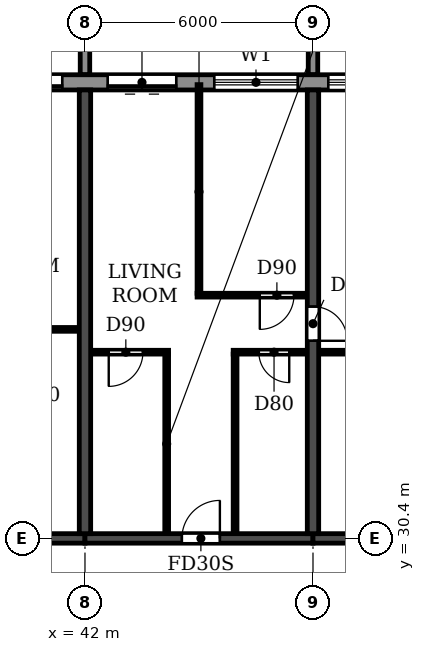
"""IFC4 building model, lengths in metres.
Left out: names, types, materials, properties, quantities, classifications, styles, units other than length and angle.
Written with IfcOpenShell. Run it as: python <this file> out.ifc"""

import sys

from ifc_helpers import new_model, si_unit, direction, frame, frame_2d, origin, place, context, subcontext, project, spatial, polyline, rectangle, outline, extrude, source, transform, mapped, element, fill, save


model = new_model("IFC4")
c1 = context("Model", 3, precision=1e-05, world=origin(), true_north=direction((0.0, 1.0)))
c2 = subcontext(c1, "Body", "Model", "MODEL_VIEW")
j1 = project(units=[si_unit("LENGTHUNIT", "METRE"), si_unit("PLANEANGLEUNIT", "RADIAN")], contexts=[c1])
p1 = place(None, origin())
s1 = spatial("IfcSite", under=j1, at=p1, CompositionType="ELEMENT")
p2 = place(p1, origin())
s2 = spatial("IfcBuilding", under=s1, at=p2, CompositionType="ELEMENT")
p3 = place(p2, frame((0.0, 0.0, 132.3)))
s3 = spatial("IfcBuildingStorey", under=s2, at=p3, CompositionType="ELEMENT", Elevation=132.3)
p4 = place(p3, frame((42.0, 30.525, 0.0), z_axis=(0.0, 0.0, 1.0), x_axis=(0.0, 1.0, 0.0)))
e1 = element("IfcWall", 1, at=p4, inside=s3, PredefinedType="SHEAR", context=c2, shape_type="SweptSolid", body=[
    extrude(rectangle(XDim=11.675, YDim=0.3, at=frame_2d((5.837, 0.0))), origin(), (0.0, 0.0, 1.0), 3.07),
])
p5 = place(p3, frame((48.0, 30.525, 0.0), z_axis=(0.0, 0.0, 1.0), x_axis=(0.0, 1.0, 0.0)))
e2 = element("IfcWall", 2, at=p5, inside=s3, PredefinedType="SHEAR", context=c2, shape_type="SweptSolid", body=[
    extrude(rectangle(XDim=11.675, YDim=0.3, at=frame_2d((5.837, 0.0))), origin(), (0.0, 0.0, 1.0), 3.07),
])
p6 = place(p5, frame((5.075, 0.0, 0.0)))
e3 = element("IfcOpeningElement", 3, at=p6, cuts=e2, PredefinedType="OPENING", context=c2, shape_type="SweptSolid", body=[
    extrude(rectangle(XDim=0.9, YDim=2.1, at=frame_2d((0.45, 1.05))), frame((0.0, 0.16, 0.0), z_axis=(0.0, -1.0, 0.0), x_axis=(1.0, 0.0, 0.0)), (0.0, 0.0, 1.0), 0.32),
])
p7 = place(p3, frame((36.0, 30.4, 0.0), z_axis=(0.0, 0.0, 1.0), x_axis=(1.0, 0.0, 0.0)))
e4 = element("IfcWall", 4, at=p7, inside=s3, PredefinedType="SHEAR", context=c2, shape_type="SweptSolid", body=[
    extrude(rectangle(XDim=6.0, YDim=0.25, at=frame_2d((3.0, 0.0))), origin(), (0.0, 0.0, 1.0), 2.47),
])
p8 = place(p7, frame((2.45, 0.0, 0.0)))
e5 = element("IfcOpeningElement", 5, at=p8, cuts=e4, PredefinedType="OPENING", context=c2, shape_type="SweptSolid", body=[
    extrude(rectangle(XDim=1.0, YDim=2.1, at=frame_2d((0.5, 1.05))), frame((0.0, 0.135, 0.0), z_axis=(0.0, -1.0, 0.0), x_axis=(1.0, 0.0, 0.0)), (0.0, 0.0, 1.0), 0.27),
])
p9 = place(p3, frame((42.0, 30.4, 0.0), z_axis=(0.0, 0.0, 1.0), x_axis=(1.0, 0.0, 0.0)))
e6 = element("IfcWall", 6, at=p9, inside=s3, PredefinedType="SHEAR", context=c2, shape_type="SweptSolid", body=[
    extrude(rectangle(XDim=6.0, YDim=0.25, at=frame_2d((3.0, 0.0))), origin(), (0.0, 0.0, 1.0), 2.47),
])
p10 = place(p9, frame((2.55, 0.0, 0.0)))
e7 = element("IfcOpeningElement", 7, at=p10, cuts=e6, PredefinedType="OPENING", context=c2, shape_type="SweptSolid", body=[
    extrude(rectangle(XDim=1.0, YDim=2.1, at=frame_2d((0.5, 1.05))), frame((0.0, 0.135, 0.0), z_axis=(0.0, -1.0, 0.0), x_axis=(1.0, 0.0, 0.0)), (0.0, 0.0, 1.0), 0.27),
])
p11 = place(p3, frame((48.0, 30.4, 0.0), z_axis=(0.0, 0.0, 1.0), x_axis=(1.0, 0.0, 0.0)))
e8 = element("IfcWall", 8, at=p11, inside=s3, PredefinedType="SHEAR", context=c2, shape_type="SweptSolid", body=[
    extrude(rectangle(XDim=6.0, YDim=0.25, at=frame_2d((3.0, 0.0))), origin(), (0.0, 0.0, 1.0), 2.47),
])
p12 = place(p3, frame((85.317, 42.4, 0.0), z_axis=(0.0, 0.0, 1.0), x_axis=(-1.0, 0.0, 0.0)))
e9 = element("IfcWall", 9, at=p12, inside=s3, PredefinedType="STANDARD", context=c2, shape_type="SweptSolid", body=[
    extrude(rectangle(XDim=68.634, YDim=0.4, at=frame_2d((34.317, 0.0))), origin(), (0.0, 0.0, 1.0), 3.07),
])
p13 = place(p12, frame((64.917, 0.0, 0.0)))
e10 = element("IfcOpeningElement", 10, at=p13, cuts=e9, PredefinedType="OPENING", context=c2, shape_type="SweptSolid", body=[
    extrude(rectangle(XDim=1.8, YDim=2.4, at=frame_2d((0.9, 1.2))), frame((0.0, 0.21, 0.0), z_axis=(0.0, -1.0, 0.0), x_axis=(1.0, 0.0, 0.0)), (0.0, 0.0, 1.0), 0.42),
])
p14 = place(p12, frame((61.717, 0.0, 0.9)))
e11 = element("IfcOpeningElement", 11, at=p14, cuts=e9, PredefinedType="OPENING", context=c2, shape_type="SweptSolid", body=[
    extrude(rectangle(XDim=2.2, YDim=1.5, at=frame_2d((1.1, 0.75))), frame((0.0, 0.21, 0.0), z_axis=(0.0, -1.0, 0.0), x_axis=(1.0, 0.0, 0.0)), (0.0, 0.0, 1.0), 0.42),
])
p15 = place(p12, frame((58.717, 0.0, 0.9)))
e12 = element("IfcOpeningElement", 12, at=p15, cuts=e9, PredefinedType="OPENING", context=c2, shape_type="SweptSolid", body=[
    extrude(rectangle(XDim=2.2, YDim=1.5, at=frame_2d((1.1, 0.75))), frame((0.0, 0.21, 0.0), z_axis=(0.0, -1.0, 0.0), x_axis=(1.0, 0.0, 0.0)), (0.0, 0.0, 1.0), 0.42),
])
p16 = place(p12, frame((55.717, 0.0, 0.9)))
e13 = element("IfcOpeningElement", 13, at=p16, cuts=e9, PredefinedType="OPENING", context=c2, shape_type="SweptSolid", body=[
    extrude(rectangle(XDim=2.2, YDim=1.5, at=frame_2d((1.1, 0.75))), frame((0.0, 0.21, 0.0), z_axis=(0.0, -1.0, 0.0), x_axis=(1.0, 0.0, 0.0)), (0.0, 0.0, 1.0), 0.42),
])
p17 = place(p12, frame((52.917, 0.0, 0.0)))
e14 = element("IfcOpeningElement", 14, at=p17, cuts=e9, PredefinedType="OPENING", context=c2, shape_type="SweptSolid", body=[
    extrude(rectangle(XDim=1.8, YDim=2.4, at=frame_2d((0.9, 1.2))), frame((0.0, 0.21, 0.0), z_axis=(0.0, -1.0, 0.0), x_axis=(1.0, 0.0, 0.0)), (0.0, 0.0, 1.0), 0.42),
])
p18 = place(p12, frame((49.717, 0.0, 0.9)))
e15 = element("IfcOpeningElement", 15, at=p18, cuts=e9, PredefinedType="OPENING", context=c2, shape_type="SweptSolid", body=[
    extrude(rectangle(XDim=2.2, YDim=1.5, at=frame_2d((1.1, 0.75))), frame((0.0, 0.21, 0.0), z_axis=(0.0, -1.0, 0.0), x_axis=(1.0, 0.0, 0.0)), (0.0, 0.0, 1.0), 0.42),
])
p19 = place(p12, frame((46.717, 0.0, 0.9)))
e16 = element("IfcOpeningElement", 16, at=p19, cuts=e9, PredefinedType="OPENING", context=c2, shape_type="SweptSolid", body=[
    extrude(rectangle(XDim=2.2, YDim=1.5, at=frame_2d((1.1, 0.75))), frame((0.0, 0.21, 0.0), z_axis=(0.0, -1.0, 0.0), x_axis=(1.0, 0.0, 0.0)), (0.0, 0.0, 1.0), 0.42),
])
p20 = place(p12, frame((43.917, 0.0, 0.0)))
e17 = element("IfcOpeningElement", 17, at=p20, cuts=e9, PredefinedType="OPENING", context=c2, shape_type="SweptSolid", body=[
    extrude(rectangle(XDim=1.8, YDim=2.4, at=frame_2d((0.9, 1.2))), frame((0.0, 0.21, 0.0), z_axis=(0.0, -1.0, 0.0), x_axis=(1.0, 0.0, 0.0)), (0.0, 0.0, 1.0), 0.42),
])
p21 = place(p12, frame((40.917, 0.0, 0.0)))
e18 = element("IfcOpeningElement", 18, at=p21, cuts=e9, PredefinedType="OPENING", context=c2, shape_type="SweptSolid", body=[
    extrude(rectangle(XDim=1.8, YDim=2.4, at=frame_2d((0.9, 1.2))), frame((0.0, 0.21, 0.0), z_axis=(0.0, -1.0, 0.0), x_axis=(1.0, 0.0, 0.0)), (0.0, 0.0, 1.0), 0.42),
])
p22 = place(p12, frame((37.717, 0.0, 0.9)))
e19 = element("IfcOpeningElement", 19, at=p22, cuts=e9, PredefinedType="OPENING", context=c2, shape_type="SweptSolid", body=[
    extrude(rectangle(XDim=2.2, YDim=1.5, at=frame_2d((1.1, 0.75))), frame((0.0, 0.21, 0.0), z_axis=(0.0, -1.0, 0.0), x_axis=(1.0, 0.0, 0.0)), (0.0, 0.0, 1.0), 0.42),
])
p23 = place(p12, frame((34.717, 0.0, 0.9)))
e20 = element("IfcOpeningElement", 20, at=p23, cuts=e9, PredefinedType="OPENING", context=c2, shape_type="SweptSolid", body=[
    extrude(rectangle(XDim=2.2, YDim=1.5, at=frame_2d((1.1, 0.75))), frame((0.0, 0.21, 0.0), z_axis=(0.0, -1.0, 0.0), x_axis=(1.0, 0.0, 0.0)), (0.0, 0.0, 1.0), 0.42),
])
p24 = place(p12, frame((31.717, 0.0, 0.9)))
e21 = element("IfcOpeningElement", 21, at=p24, cuts=e9, PredefinedType="OPENING", context=c2, shape_type="SweptSolid", body=[
    extrude(rectangle(XDim=2.2, YDim=1.5, at=frame_2d((1.1, 0.75))), frame((0.0, 0.21, 0.0), z_axis=(0.0, -1.0, 0.0), x_axis=(1.0, 0.0, 0.0)), (0.0, 0.0, 1.0), 0.42),
])
p25 = place(p12, frame((28.917, 0.0, 0.0)))
e22 = element("IfcOpeningElement", 22, at=p25, cuts=e9, PredefinedType="OPENING", context=c2, shape_type="SweptSolid", body=[
    extrude(rectangle(XDim=1.8, YDim=2.4, at=frame_2d((0.9, 1.2))), frame((0.0, 0.21, 0.0), z_axis=(0.0, -1.0, 0.0), x_axis=(1.0, 0.0, 0.0)), (0.0, 0.0, 1.0), 0.42),
])
p26 = place(p12, frame((25.717, 0.0, 0.9)))
e23 = element("IfcOpeningElement", 23, at=p26, cuts=e9, PredefinedType="OPENING", context=c2, shape_type="SweptSolid", body=[
    extrude(rectangle(XDim=2.2, YDim=1.5, at=frame_2d((1.1, 0.75))), frame((0.0, 0.21, 0.0), z_axis=(0.0, -1.0, 0.0), x_axis=(1.0, 0.0, 0.0)), (0.0, 0.0, 1.0), 0.42),
])
p27 = place(p12, frame((22.717, 0.0, 0.9)))
e24 = element("IfcOpeningElement", 24, at=p27, cuts=e9, PredefinedType="OPENING", context=c2, shape_type="SweptSolid", body=[
    extrude(rectangle(XDim=2.2, YDim=1.5, at=frame_2d((1.1, 0.75))), frame((0.0, 0.21, 0.0), z_axis=(0.0, -1.0, 0.0), x_axis=(1.0, 0.0, 0.0)), (0.0, 0.0, 1.0), 0.42),
])
p28 = place(p12, frame((19.717, 0.0, 0.9)))
e25 = element("IfcOpeningElement", 25, at=p28, cuts=e9, PredefinedType="OPENING", context=c2, shape_type="SweptSolid", body=[
    extrude(rectangle(XDim=2.2, YDim=1.5, at=frame_2d((1.1, 0.75))), frame((0.0, 0.21, 0.0), z_axis=(0.0, -1.0, 0.0), x_axis=(1.0, 0.0, 0.0)), (0.0, 0.0, 1.0), 0.42),
])
p29 = place(p12, frame((16.717, 0.0, 0.9)))
e26 = element("IfcOpeningElement", 26, at=p29, cuts=e9, PredefinedType="OPENING", context=c2, shape_type="SweptSolid", body=[
    extrude(rectangle(XDim=2.2, YDim=1.5, at=frame_2d((1.1, 0.75))), frame((0.0, 0.21, 0.0), z_axis=(0.0, -1.0, 0.0), x_axis=(1.0, 0.0, 0.0)), (0.0, 0.0, 1.0), 0.42),
])
p30 = place(p12, frame((13.917, 0.0, 0.0)))
e27 = element("IfcOpeningElement", 27, at=p30, cuts=e9, PredefinedType="OPENING", context=c2, shape_type="SweptSolid", body=[
    extrude(rectangle(XDim=1.8, YDim=2.4, at=frame_2d((0.9, 1.2))), frame((0.0, 0.21, 0.0), z_axis=(0.0, -1.0, 0.0), x_axis=(1.0, 0.0, 0.0)), (0.0, 0.0, 1.0), 0.42),
])
p31 = place(p12, frame((10.717, 0.0, 0.9)))
e28 = element("IfcOpeningElement", 28, at=p31, cuts=e9, PredefinedType="OPENING", context=c2, shape_type="SweptSolid", body=[
    extrude(rectangle(XDim=2.2, YDim=1.5, at=frame_2d((1.1, 0.75))), frame((0.0, 0.21, 0.0), z_axis=(0.0, -1.0, 0.0), x_axis=(1.0, 0.0, 0.0)), (0.0, 0.0, 1.0), 0.42),
])
p32 = place(p12, frame((7.917, 0.0, 0.0)))
e29 = element("IfcOpeningElement", 29, at=p32, cuts=e9, PredefinedType="OPENING", context=c2, shape_type="SweptSolid", body=[
    extrude(rectangle(XDim=1.8, YDim=2.4, at=frame_2d((0.9, 1.2))), frame((0.0, 0.21, 0.0), z_axis=(0.0, -1.0, 0.0), x_axis=(1.0, 0.0, 0.0)), (0.0, 0.0, 1.0), 0.42),
])
p33 = place(p12, frame((4.717, 0.0, 0.9)))
e30 = element("IfcOpeningElement", 30, at=p33, cuts=e9, PredefinedType="OPENING", context=c2, shape_type="SweptSolid", body=[
    extrude(rectangle(XDim=2.2, YDim=1.5, at=frame_2d((1.1, 0.75))), frame((0.0, 0.21, 0.0), z_axis=(0.0, -1.0, 0.0), x_axis=(1.0, 0.0, 0.0)), (0.0, 0.0, 1.0), 0.42),
])
p34 = place(p12, frame((1.917, 0.0, 0.0)))
e31 = element("IfcOpeningElement", 31, at=p34, cuts=e9, PredefinedType="OPENING", context=c2, shape_type="SweptSolid", body=[
    extrude(rectangle(XDim=1.8, YDim=2.4, at=frame_2d((0.9, 1.2))), frame((0.0, 0.21, 0.0), z_axis=(0.0, -1.0, 0.0), x_axis=(1.0, 0.0, 0.0)), (0.0, 0.0, 1.0), 0.42),
])
m1 = source(origin(), c2, "Body", "SweptSolid", [
    extrude(outline(polyline([(0.0, 0.0), (0.25, 0.0), (0.25, 3.1), (0.0, 3.1), (0.0, 0.0)])), origin(), (0.0, 0.0, 1.0), 3.1),
])
for number, where in (
    (32, (41.875, 42.6, 0.0)),
    (33, (47.875, 42.6, 0.0)),
):
    element("IfcWall", number, at=place(p3, frame(where)), inside=s3, PredefinedType="STANDARD", context=c2, shape_type="MappedRepresentation", body=[
        mapped(m1, transform((0.0, 0.0, 0.0))),
    ])
p35 = place(p3, frame((42.16, 35.3, 0.0), z_axis=(0.0, 0.0, 1.0), x_axis=(1.0, 0.0, 0.0)))
e34 = element("IfcWall", 34, at=p35, inside=s3, PredefinedType="PARTITIONING", context=c2, shape_type="SweptSolid", body=[
    extrude(rectangle(XDim=2.04, YDim=0.1, at=frame_2d((1.02, 0.0))), origin(), (0.0, 0.0, 1.0), 3.07),
])
p36 = place(p35, frame((0.465, 0.0, 0.0)))
e35 = element("IfcOpeningElement", 35, at=p36, cuts=e34, PredefinedType="OPENING", context=c2, shape_type="SweptSolid", body=[
    extrude(rectangle(XDim=0.9, YDim=2.1, at=frame_2d((0.45, 1.05))), frame((0.0, 0.06, 0.0), z_axis=(0.0, -1.0, 0.0), x_axis=(1.0, 0.0, 0.0)), (0.0, 0.0, 1.0), 0.12),
])
p37 = place(p3, frame((45.9, 35.3, 0.0), z_axis=(0.0, 0.0, 1.0), x_axis=(1.0, 0.0, 0.0)))
e36 = element("IfcWall", 36, at=p37, inside=s3, PredefinedType="PARTITIONING", context=c2, shape_type="SweptSolid", body=[
    extrude(rectangle(XDim=1.94, YDim=0.1, at=frame_2d((0.97, 0.0))), origin(), (0.0, 0.0, 1.0), 3.07),
])
p38 = place(p37, frame((0.675, 0.0, 0.0)))
e37 = element("IfcOpeningElement", 37, at=p38, cuts=e36, PredefinedType="OPENING", context=c2, shape_type="SweptSolid", body=[
    extrude(rectangle(XDim=0.8, YDim=2.1, at=frame_2d((0.4, 1.05))), frame((0.0, 0.06, 0.0), z_axis=(0.0, -1.0, 0.0), x_axis=(1.0, 0.0, 0.0)), (0.0, 0.0, 1.0), 0.12),
])
p39 = place(p3, frame((48.16, 35.3, 0.0), z_axis=(0.0, 0.0, 1.0), x_axis=(1.0, 0.0, 0.0)))
e38 = element("IfcWall", 38, at=p39, inside=s3, PredefinedType="PARTITIONING", context=c2, shape_type="SweptSolid", body=[
    extrude(rectangle(XDim=2.74, YDim=0.1, at=frame_2d((1.37, 0.0))), origin(), (0.0, 0.0, 1.0), 3.07),
])
p40 = place(p39, frame((0.94, 0.0, 0.0)))
e39 = element("IfcOpeningElement", 39, at=p40, cuts=e38, PredefinedType="OPENING", context=c2, shape_type="SweptSolid", body=[
    extrude(rectangle(XDim=0.8, YDim=2.1, at=frame_2d((0.4, 1.05))), frame((0.0, 0.06, 0.0), z_axis=(0.0, -1.0, 0.0), x_axis=(1.0, 0.0, 0.0)), (0.0, 0.0, 1.0), 0.12),
])
p41 = place(p3, frame((39.8, 35.9, 0.0), z_axis=(0.0, 0.0, 1.0), x_axis=(1.0, 0.0, 0.0)))
e40 = element("IfcWall", 40, at=p41, inside=s3, PredefinedType="PARTITIONING", context=c2, shape_type="SweptSolid", body=[
    extrude(rectangle(XDim=2.04, YDim=0.1, at=frame_2d((1.02, 0.0))), origin(), (0.0, 0.0, 1.0), 3.07),
])
p42 = place(p3, frame((44.95, 36.8, 0.0), z_axis=(0.0, 0.0, 1.0), x_axis=(1.0, 0.0, 0.0)))
e41 = element("IfcWall", 41, at=p42, inside=s3, PredefinedType="PARTITIONING", context=c2, shape_type="SweptSolid", body=[
    extrude(rectangle(XDim=2.89, YDim=0.1, at=frame_2d((1.445, 0.0))), origin(), (0.0, 0.0, 1.0), 3.07),
])
p43 = place(p42, frame((1.65, 0.0, 0.0)))
e42 = element("IfcOpeningElement", 42, at=p43, cuts=e41, PredefinedType="OPENING", context=c2, shape_type="SweptSolid", body=[
    extrude(rectangle(XDim=0.9, YDim=2.1, at=frame_2d((0.45, 1.05))), frame((0.0, 0.06, 0.0), z_axis=(0.0, -1.0, 0.0), x_axis=(1.0, 0.0, 0.0)), (0.0, 0.0, 1.0), 0.12),
])
p44 = place(p3, frame((44.15, 30.535, 0.0), z_axis=(0.0, 0.0, 1.0), x_axis=(0.0, 1.0, 0.0)))
e43 = element("IfcWall", 43, at=p44, inside=s3, PredefinedType="PARTITIONING", context=c2, shape_type="SweptSolid", body=[
    extrude(rectangle(XDim=4.715, YDim=0.1, at=frame_2d((2.357, 0.0))), origin(), (0.0, 0.0, 1.0), 3.07),
])
p45 = place(p3, frame((45.0, 36.85, 0.0), z_axis=(0.0, 0.0, 1.0), x_axis=(0.0, 1.0, 0.0)))
e44 = element("IfcWall", 44, at=p45, inside=s3, PredefinedType="PARTITIONING", context=c2, shape_type="SweptSolid", body=[
    extrude(rectangle(XDim=5.49, YDim=0.1, at=frame_2d((2.745, 0.0))), origin(), (0.0, 0.0, 1.0), 3.07),
])
p46 = place(p3, frame((45.95, 30.535, 0.0), z_axis=(0.0, 0.0, 1.0), x_axis=(0.0, 1.0, 0.0)))
e45 = element("IfcWall", 45, at=p46, inside=s3, PredefinedType="PARTITIONING", context=c2, shape_type="SweptSolid", body=[
    extrude(rectangle(XDim=4.715, YDim=0.1, at=frame_2d((2.357, 0.0))), origin(), (0.0, 0.0, 1.0), 3.07),
])
p47 = place(p20, origin())
e46 = element("IfcDoor", 46, at=p47, inside=s3, OperationType="DOUBLE_DOOR_SLIDING", PredefinedType="DOOR", context=c2, shape_type="SweptSolid", body=[
    extrude(rectangle(XDim=1.8, YDim=2.4, at=frame_2d((0.9, 1.2))), frame((0.0, 0.025, 0.0), z_axis=(0.0, -1.0, 0.0), x_axis=(1.0, 0.0, 0.0)), (0.0, 0.0, 1.0), 0.05),
])
fill(e17, e46)
p48 = place(p21, origin())
e47 = element("IfcDoor", 47, at=p48, inside=s3, OperationType="DOUBLE_DOOR_SLIDING", PredefinedType="DOOR", context=c2, shape_type="SweptSolid", body=[
    extrude(rectangle(XDim=1.8, YDim=2.4, at=frame_2d((0.9, 1.2))), frame((0.0, 0.025, 0.0), z_axis=(0.0, -1.0, 0.0), x_axis=(1.0, 0.0, 0.0)), (0.0, 0.0, 1.0), 0.05),
])
fill(e18, e47)
p49 = place(p22, origin())
e48 = element("IfcWindow", 48, at=p49, inside=s3, PartitioningType="DOUBLE_PANEL_HORIZONTAL", PredefinedType="WINDOW", context=c2, shape_type="SweptSolid", body=[
    extrude(rectangle(XDim=2.2, YDim=1.5, at=frame_2d((1.1, 0.75))), frame((0.0, 0.03, 0.0), z_axis=(0.0, -1.0, 0.0), x_axis=(1.0, 0.0, 0.0)), (0.0, 0.0, 1.0), 0.06),
])
fill(e19, e48)
p50 = place(p23, origin())
e49 = element("IfcWindow", 49, at=p50, inside=s3, PartitioningType="DOUBLE_PANEL_HORIZONTAL", PredefinedType="WINDOW", context=c2, shape_type="SweptSolid", body=[
    extrude(rectangle(XDim=2.2, YDim=1.5, at=frame_2d((1.1, 0.75))), frame((0.0, 0.03, 0.0), z_axis=(0.0, -1.0, 0.0), x_axis=(1.0, 0.0, 0.0)), (0.0, 0.0, 1.0), 0.06),
])
fill(e20, e49)
p51 = place(p36, frame((0.9, 0.0, 0.0), z_axis=(0.0, 0.0, 1.0), x_axis=(-1.0, 0.0, 0.0)))
e50 = element("IfcDoor", 50, at=p51, inside=s3, OperationType="SINGLE_SWING_RIGHT", PredefinedType="DOOR", context=c2, shape_type="SweptSolid", body=[
    extrude(rectangle(XDim=0.9, YDim=2.1, at=frame_2d((0.45, 1.05))), frame((0.0, 0.025, 0.0), z_axis=(0.0, -1.0, 0.0), x_axis=(1.0, 0.0, 0.0)), (0.0, 0.0, 1.0), 0.05),
])
fill(e35, e50)
p52 = place(p10, origin())
e51 = element("IfcDoor", 51, at=p52, inside=s3, OperationType="SINGLE_SWING_RIGHT", PredefinedType="DOOR", context=c2, shape_type="SweptSolid", body=[
    extrude(rectangle(XDim=1.0, YDim=2.1, at=frame_2d((0.5, 1.05))), frame((0.0, 0.025, 0.0), z_axis=(0.0, -1.0, 0.0), x_axis=(1.0, 0.0, 0.0)), (0.0, 0.0, 1.0), 0.05),
])
fill(e7, e51)
p53 = place(p38, frame((0.8, 0.0, 0.0), z_axis=(0.0, 0.0, 1.0), x_axis=(-1.0, 0.0, 0.0)))
e52 = element("IfcDoor", 52, at=p53, inside=s3, OperationType="SINGLE_SWING_LEFT", PredefinedType="DOOR", context=c2, shape_type="SweptSolid", body=[
    extrude(rectangle(XDim=0.8, YDim=2.1, at=frame_2d((0.4, 1.05))), frame((0.0, 0.025, 0.0), z_axis=(0.0, -1.0, 0.0), x_axis=(1.0, 0.0, 0.0)), (0.0, 0.0, 1.0), 0.05),
])
fill(e37, e52)
p54 = place(p43, frame((0.9, 0.0, 0.0), z_axis=(0.0, 0.0, 1.0), x_axis=(-1.0, 0.0, 0.0)))
e53 = element("IfcDoor", 53, at=p54, inside=s3, OperationType="SINGLE_SWING_RIGHT", PredefinedType="DOOR", context=c2, shape_type="SweptSolid", body=[
    extrude(rectangle(XDim=0.9, YDim=2.1, at=frame_2d((0.45, 1.05))), frame((0.0, 0.025, 0.0), z_axis=(0.0, -1.0, 0.0), x_axis=(1.0, 0.0, 0.0)), (0.0, 0.0, 1.0), 0.05),
])
fill(e42, e53)
p55 = place(p6, frame((0.9, 0.0, 0.0), z_axis=(0.0, 0.0, 1.0), x_axis=(-1.0, 0.0, 0.0)))
e54 = element("IfcDoor", 54, at=p55, inside=s3, OperationType="SINGLE_SWING_RIGHT", PredefinedType="DOOR", context=c2, shape_type="SweptSolid", body=[
    extrude(rectangle(XDim=0.9, YDim=2.1, at=frame_2d((0.45, 1.05))), frame((0.0, 0.025, 0.0), z_axis=(0.0, -1.0, 0.0), x_axis=(1.0, 0.0, 0.0)), (0.0, 0.0, 1.0), 0.05),
])
fill(e3, e54)
save(model, sys.argv[1])
